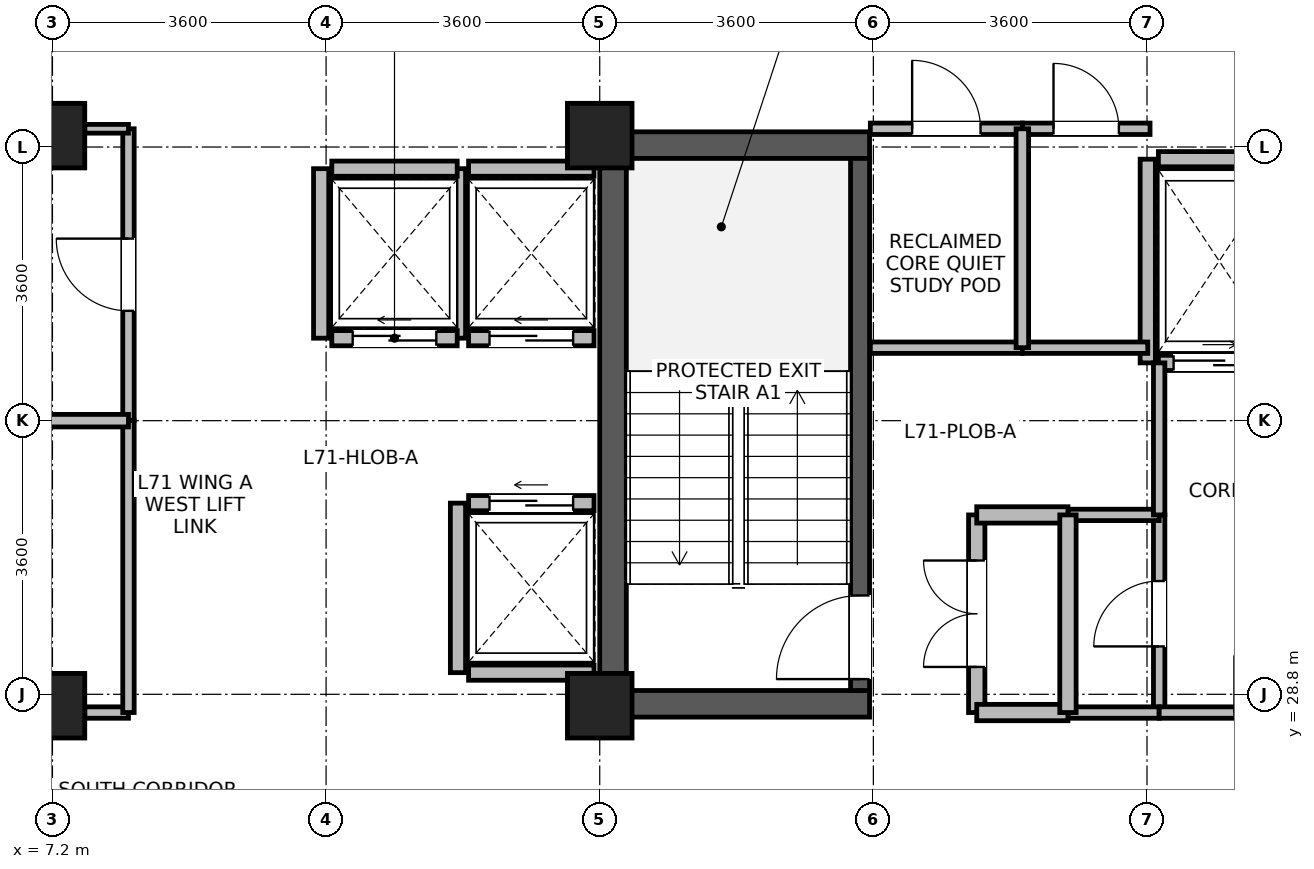
"""IFC4 building model, lengths in metres.
Left out: names, types, materials, properties, quantities, classifications, styles, units other than length and angle.
Written with IfcOpenShell. Run it as: python <this file> out.ifc"""

import sys

from ifc_helpers import new_model, si_unit, direction, frame, frame_2d, origin, origin_2d, place, context, subcontext, project, spatial, rectangle, extrude, source, transform, mapped, element, fill, save


model = new_model("IFC4")
c1 = context("Model", 3, precision=1e-05, world=origin(), true_north=direction((0.0, 1.0)))
c2 = subcontext(c1, "Body", "Model", "MODEL_VIEW")
j1 = project(units=[si_unit("LENGTHUNIT", "METRE"), si_unit("PLANEANGLEUNIT", "RADIAN")], contexts=[c1])
p1 = place(None, origin())
s1 = spatial("IfcSite", under=j1, at=p1, CompositionType="ELEMENT")
p2 = place(p1, origin())
s2 = spatial("IfcBuilding", under=s1, at=p2, CompositionType="ELEMENT")
p3 = place(p2, frame((0.0, 0.0, 275.8)))
s3 = spatial("IfcBuildingStorey", under=s2, at=p3, CompositionType="ELEMENT", Elevation=275.8)
p4 = place(p3, frame((14.575, 28.5, 0.0), z_axis=(0.0, 0.0, 1.0), x_axis=(0.0, 1.0, 0.0)))
e1 = element("IfcWall", 1, at=p4, inside=s3, PredefinedType="SHEAR", context=c2, shape_type="SweptSolid", body=[
    extrude(rectangle(XDim=7.7, YDim=0.35, at=frame_2d((3.85, 0.0))), origin(), (0.0, 0.0, 1.0), 3.475),
])
for number, where, z_axis, x_axis in (
    (2, (14.75, 28.675, 0.0), (0.0, 0.0, 1.0), (1.0, 0.0, 0.0)),
    (3, (14.75, 36.025, 0.0), (0.0, 0.0, 1.0), (1.0, 0.0, 0.0)),
):
    element("IfcWall", number, at=place(p3, frame(where, z_axis=z_axis, x_axis=x_axis)), inside=s3, PredefinedType="SHEAR", context=c2, shape_type="SweptSolid", body=[
        extrude(rectangle(XDim=3.2, YDim=0.35, at=frame_2d((1.6, 0.0))), origin(), (0.0, 0.0, 1.0), 3.475),
    ])
p5 = place(p3, frame((17.825, 28.85, 0.0), z_axis=(0.0, 0.0, 1.0), x_axis=(0.0, 1.0, 0.0)))
e4 = element("IfcWall", 4, at=p5, inside=s3, PredefinedType="SHEAR", context=c2, shape_type="SweptSolid", body=[
    extrude(rectangle(XDim=7.0, YDim=0.25, at=frame_2d((3.5, 0.0))), origin(), (0.0, 0.0, 1.0), 3.475),
])
p6 = place(p5, frame((0.15, 0.0, 0.0)))
e5 = element("IfcOpeningElement", 5, at=p6, cuts=e4, PredefinedType="OPENING", context=c2, shape_type="SweptSolid", body=[
    extrude(rectangle(XDim=1.1, YDim=2.08, at=frame_2d((0.55, 1.04))), frame((0.0, 0.135, 0.0), z_axis=(0.0, -1.0, 0.0), x_axis=(1.0, 0.0, 0.0)), (0.0, 0.0, 1.0), 0.27),
])
m1 = source(origin(), c2, "Body", "SweptSolid", [
    extrude(rectangle(XDim=0.85, YDim=0.85, at=origin_2d()), origin(), (0.0, 0.0, 1.0), 3.7),
])
for number, where, z_axis, x_axis in (
    (6, (7.2, 28.65, 0.0), (0.0, 0.0, 1.0), (1.0, 0.0, 0.0)),
    (7, (7.2, 36.15, 0.0), (0.0, 0.0, 1.0), (1.0, 0.0, 0.0)),
    (8, (14.4, 28.65, 0.0), (0.0, 0.0, 1.0), (1.0, 0.0, 0.0)),
    (9, (14.4, 36.15, 0.0), (0.0, 0.0, 1.0), (1.0, 0.0, 0.0)),
):
    element("IfcColumn", number, at=place(p3, frame(where, z_axis=z_axis, x_axis=x_axis)), inside=s3, PredefinedType="COLUMN", context=c2, shape_type="MappedRepresentation", body=[
        mapped(m1, transform((0.0, 0.0, 0.0), x_axis=(1.0, 0.0, 0.0), y_axis=(0.0, 1.0, 0.0), z_axis=(0.0, 0.0, 1.0), scale=1.0)),
    ])
p7 = place(p3, frame((12.675, 33.485, 0.0), z_axis=(0.0, 0.0, 1.0), x_axis=(1.0, 0.0, 0.0)))
e10 = element("IfcWall", 10, at=p7, inside=s3, PredefinedType="PARTITIONING", context=c2, shape_type="SweptSolid", body=[
    extrude(rectangle(XDim=1.65, YDim=0.2, at=frame_2d((0.825, 0.0))), origin(), (0.0, 0.0, 1.0), 3.455),
])
p8 = place(p7, frame((0.275, 0.0, 0.0)))
e11 = element("IfcOpeningElement", 11, at=p8, cuts=e10, PredefinedType="OPENING", context=c2, shape_type="SweptSolid", body=[
    extrude(rectangle(XDim=1.1, YDim=2.12, at=frame_2d((0.55, 1.06))), frame((0.0, 0.11, 0.0), z_axis=(0.0, -1.0, 0.0), x_axis=(1.0, 0.0, 0.0)), (0.0, 0.0, 1.0), 0.22),
])
p9 = place(p3, frame((12.675, 35.715, 0.0), z_axis=(0.0, 0.0, 1.0), x_axis=(1.0, 0.0, 0.0)))
e12 = element("IfcWall", 12, at=p9, inside=s3, PredefinedType="PARTITIONING", context=c2, shape_type="SweptSolid", body=[
    extrude(rectangle(XDim=1.65, YDim=0.2, at=frame_2d((0.825, 0.0))), origin(), (0.0, 0.0, 1.0), 3.455),
])
p10 = place(p3, frame((12.535, 33.485, 0.0), z_axis=(0.0, 0.0, 1.0), x_axis=(0.0, 1.0, 0.0)))
e13 = element("IfcWall", 13, at=p10, inside=s3, PredefinedType="PARTITIONING", context=c2, shape_type="SweptSolid", body=[
    extrude(rectangle(XDim=2.23, YDim=0.2, at=frame_2d((1.115, 0.0))), origin(), (0.0, 0.0, 1.0), 3.455),
])
p11 = place(p3, frame((12.675, 29.085, 0.0), z_axis=(0.0, 0.0, 1.0), x_axis=(1.0, 0.0, 0.0)))
e14 = element("IfcWall", 14, at=p11, inside=s3, PredefinedType="PARTITIONING", context=c2, shape_type="SweptSolid", body=[
    extrude(rectangle(XDim=1.65, YDim=0.2, at=frame_2d((0.825, 0.0))), origin(), (0.0, 0.0, 1.0), 3.455),
])
p12 = place(p3, frame((12.675, 31.315, 0.0), z_axis=(0.0, 0.0, 1.0), x_axis=(1.0, 0.0, 0.0)))
e15 = element("IfcWall", 15, at=p12, inside=s3, PredefinedType="PARTITIONING", context=c2, shape_type="SweptSolid", body=[
    extrude(rectangle(XDim=1.65, YDim=0.2, at=frame_2d((0.825, 0.0))), origin(), (0.0, 0.0, 1.0), 3.455),
])
p13 = place(p12, frame((0.275, 0.0, 0.0)))
e16 = element("IfcOpeningElement", 16, at=p13, cuts=e15, PredefinedType="OPENING", context=c2, shape_type="SweptSolid", body=[
    extrude(rectangle(XDim=1.1, YDim=2.12, at=frame_2d((0.55, 1.06))), frame((0.0, 0.11, 0.0), z_axis=(0.0, -1.0, 0.0), x_axis=(1.0, 0.0, 0.0)), (0.0, 0.0, 1.0), 0.22),
])
p14 = place(p3, frame((12.535, 29.085, 0.0), z_axis=(0.0, 0.0, 1.0), x_axis=(0.0, 1.0, 0.0)))
e17 = element("IfcWall", 17, at=p14, inside=s3, PredefinedType="PARTITIONING", context=c2, shape_type="SweptSolid", body=[
    extrude(rectangle(XDim=2.23, YDim=0.2, at=frame_2d((1.115, 0.0))), origin(), (0.0, 0.0, 1.0), 3.455),
])
p15 = place(p3, frame((10.875, 33.485, 0.0), z_axis=(0.0, 0.0, 1.0), x_axis=(1.0, 0.0, 0.0)))
e18 = element("IfcWall", 18, at=p15, inside=s3, PredefinedType="PARTITIONING", context=c2, shape_type="SweptSolid", body=[
    extrude(rectangle(XDim=1.65, YDim=0.2, at=frame_2d((0.825, 0.0))), origin(), (0.0, 0.0, 1.0), 3.455),
])
p16 = place(p15, frame((0.275, 0.0, 0.0)))
e19 = element("IfcOpeningElement", 19, at=p16, cuts=e18, PredefinedType="OPENING", context=c2, shape_type="SweptSolid", body=[
    extrude(rectangle(XDim=1.1, YDim=2.12, at=frame_2d((0.55, 1.06))), frame((0.0, 0.11, 0.0), z_axis=(0.0, -1.0, 0.0), x_axis=(1.0, 0.0, 0.0)), (0.0, 0.0, 1.0), 0.22),
])
p17 = place(p3, frame((10.875, 35.715, 0.0), z_axis=(0.0, 0.0, 1.0), x_axis=(1.0, 0.0, 0.0)))
e20 = element("IfcWall", 20, at=p17, inside=s3, PredefinedType="PARTITIONING", context=c2, shape_type="SweptSolid", body=[
    extrude(rectangle(XDim=1.65, YDim=0.2, at=frame_2d((0.825, 0.0))), origin(), (0.0, 0.0, 1.0), 3.455),
])
p18 = place(p3, frame((10.735, 33.485, 0.0), z_axis=(0.0, 0.0, 1.0), x_axis=(0.0, 1.0, 0.0)))
e21 = element("IfcWall", 21, at=p18, inside=s3, PredefinedType="PARTITIONING", context=c2, shape_type="SweptSolid", body=[
    extrude(rectangle(XDim=2.23, YDim=0.2, at=frame_2d((1.115, 0.0))), origin(), (0.0, 0.0, 1.0), 3.455),
])
p19 = place(p3, frame((21.75, 33.16, 0.0), z_axis=(0.0, 0.0, 1.0), x_axis=(1.0, 0.0, 0.0)))
e22 = element("IfcWall", 22, at=p19, inside=s3, PredefinedType="PARTITIONING", context=c2, shape_type="SweptSolid", body=[
    extrude(rectangle(XDim=1.6, YDim=0.2, at=frame_2d((0.8, 0.0))), origin(), (0.0, 0.0, 1.0), 3.455),
])
p20 = place(p19, frame((0.2, 0.0, 0.0)))
e23 = element("IfcOpeningElement", 23, at=p20, cuts=e22, PredefinedType="OPENING", context=c2, shape_type="SweptSolid", body=[
    extrude(rectangle(XDim=1.2, YDim=2.12, at=frame_2d((0.6, 1.06))), frame((0.0, 0.11, 0.0), z_axis=(0.0, -1.0, 0.0), x_axis=(1.0, 0.0, 0.0)), (0.0, 0.0, 1.0), 0.22),
])
p21 = place(p3, frame((21.75, 35.84, 0.0), z_axis=(0.0, 0.0, 1.0), x_axis=(1.0, 0.0, 0.0)))
e24 = element("IfcWall", 24, at=p21, inside=s3, PredefinedType="PARTITIONING", context=c2, shape_type="SweptSolid", body=[
    extrude(rectangle(XDim=1.6, YDim=0.2, at=frame_2d((0.8, 0.0))), origin(), (0.0, 0.0, 1.0), 2.555),
])
p22 = place(p3, frame((21.61, 33.16, 0.0), z_axis=(0.0, 0.0, 1.0), x_axis=(0.0, 1.0, 0.0)))
e25 = element("IfcWall", 25, at=p22, inside=s3, PredefinedType="PARTITIONING", context=c2, shape_type="SweptSolid", body=[
    extrude(rectangle(XDim=2.68, YDim=0.2, at=frame_2d((1.34, 0.0))), origin(), (0.0, 0.0, 1.0), 3.455),
])
p23 = place(p3, frame((7.625, 28.56, 0.0), z_axis=(0.0, 0.0, 1.0), x_axis=(1.0, 0.0, 0.0)))
e26 = element("IfcWall", 26, at=p23, inside=s3, PredefinedType="PARTITIONING", context=c2, shape_type="SweptSolid", body=[
    extrude(rectangle(XDim=0.575, YDim=0.15, at=frame_2d((0.288, 0.0))), origin(), (0.0, 0.0, 1.0), 2.905),
])
p24 = place(p3, frame((8.2, 32.4, 0.0), z_axis=(0.0, 0.0, 1.0), x_axis=(0.0, 1.0, 0.0)))
e27 = element("IfcWall", 27, at=p24, inside=s3, PredefinedType="PARTITIONING", context=c2, shape_type="SweptSolid", body=[
    extrude(rectangle(XDim=3.84, YDim=0.15, at=frame_2d((1.92, 0.0))), origin(), (0.0, 0.0, 1.0), 3.455),
])
p25 = place(p24, frame((1.445, 0.0, 0.0)))
e28 = element("IfcOpeningElement", 28, at=p25, cuts=e27, PredefinedType="OPENING", context=c2, shape_type="SweptSolid", body=[
    extrude(rectangle(XDim=0.95, YDim=2.1, at=frame_2d((0.475, 1.05))), frame((0.0, 0.085, 0.0), z_axis=(0.0, -1.0, 0.0), x_axis=(1.0, 0.0, 0.0)), (0.0, 0.0, 1.0), 0.17),
])
p26 = place(p3, frame((8.2, 28.56, 0.0), z_axis=(0.0, 0.0, 1.0), x_axis=(0.0, 1.0, 0.0)))
e29 = element("IfcWall", 29, at=p26, inside=s3, PredefinedType="PARTITIONING", context=c2, shape_type="SweptSolid", body=[
    extrude(rectangle(XDim=3.84, YDim=0.15, at=frame_2d((1.92, 0.0))), origin(), (0.0, 0.0, 1.0), 3.455),
])
p27 = place(p3, frame((19.36, 28.56, 0.0), z_axis=(0.0, 0.0, 1.0), x_axis=(0.0, 1.0, 0.0)))
e30 = element("IfcWall", 30, at=p27, inside=s3, PredefinedType="PARTITIONING", context=c2, shape_type="SweptSolid", body=[
    extrude(rectangle(XDim=2.6, YDim=0.215, at=frame_2d((1.3, 0.0))), origin(), (0.0, 0.0, 1.0), 3.455),
])
p28 = place(p27, frame((0.6, 0.0, 0.0)))
e31 = element("IfcOpeningElement", 31, at=p28, cuts=e30, PredefinedType="OPENING", context=c2, shape_type="SweptSolid", body=[
    extrude(rectangle(XDim=1.4, YDim=2.15, at=frame_2d((0.7, 1.075))), frame((0.0, 0.118, 0.0), z_axis=(0.0, -1.0, 0.0), x_axis=(1.0, 0.0, 0.0)), (0.0, 0.0, 1.0), 0.235),
])
p29 = place(p3, frame((21.76, 28.56, 0.0), z_axis=(0.0, 0.0, 1.0), x_axis=(0.0, 1.0, 0.0)))
e32 = element("IfcWall", 32, at=p29, inside=s3, PredefinedType="PARTITIONING", context=c2, shape_type="SweptSolid", body=[
    extrude(rectangle(XDim=2.6, YDim=0.15, at=frame_2d((1.3, 0.0))), origin(), (0.0, 0.0, 1.0), 3.455),
])
p30 = place(p29, frame((0.87, 0.0, 0.0)))
e33 = element("IfcOpeningElement", 33, at=p30, cuts=e32, PredefinedType="OPENING", context=c2, shape_type="SweptSolid", body=[
    extrude(rectangle(XDim=0.86, YDim=2.02, at=frame_2d((0.43, 1.01))), frame((0.0, 0.085, 0.0), z_axis=(0.0, -1.0, 0.0), x_axis=(1.0, 0.0, 0.0)), (0.0, 0.0, 1.0), 0.17),
])
p31 = place(p3, frame((17.96, 33.36, 0.0), z_axis=(0.0, 0.0, 1.0), x_axis=(1.0, 0.0, 0.0)))
e34 = element("IfcWall", 34, at=p31, inside=s3, PredefinedType="PARTITIONING", context=c2, shape_type="SweptSolid", body=[
    extrude(rectangle(XDim=2.0, YDim=0.15, at=frame_2d((1.0, 0.0))), origin(), (0.0, 0.0, 1.0), 3.455),
])
p32 = place(p3, frame((17.96, 36.24, 0.0), z_axis=(0.0, 0.0, 1.0), x_axis=(1.0, 0.0, 0.0)))
e35 = element("IfcWall", 35, at=p32, inside=s3, PredefinedType="PARTITIONING", context=c2, shape_type="SweptSolid", body=[
    extrude(rectangle(XDim=2.0, YDim=0.15, at=frame_2d((1.0, 0.0))), origin(), (0.0, 0.0, 1.0), 2.555),
])
p33 = place(p32, frame((0.55, 0.0, 0.0)))
e36 = element("IfcOpeningElement", 36, at=p33, cuts=e35, PredefinedType="OPENING", context=c2, shape_type="SweptSolid", body=[
    extrude(rectangle(XDim=0.9, YDim=2.08, at=frame_2d((0.45, 1.04))), frame((0.0, 0.085, 0.0), z_axis=(0.0, -1.0, 0.0), x_axis=(1.0, 0.0, 0.0)), (0.0, 0.0, 1.0), 0.17),
])
p34 = place(p3, frame((19.96, 33.36, 0.0), z_axis=(0.0, 0.0, 1.0), x_axis=(1.0, 0.0, 0.0)))
e37 = element("IfcWall", 37, at=p34, inside=s3, PredefinedType="PARTITIONING", context=c2, shape_type="SweptSolid", body=[
    extrude(rectangle(XDim=1.65, YDim=0.15, at=frame_2d((0.825, 0.0))), origin(), (0.0, 0.0, 1.0), 3.455),
])
p35 = place(p3, frame((19.96, 36.24, 0.0), z_axis=(0.0, 0.0, 1.0), x_axis=(1.0, 0.0, 0.0)))
e38 = element("IfcWall", 38, at=p35, inside=s3, PredefinedType="PARTITIONING", context=c2, shape_type="SweptSolid", body=[
    extrude(rectangle(XDim=1.68, YDim=0.15, at=frame_2d((0.84, 0.0))), origin(), (0.0, 0.0, 1.0), 2.555),
])
p36 = place(p35, frame((0.41, 0.0, 0.0)))
e39 = element("IfcOpeningElement", 39, at=p36, cuts=e38, PredefinedType="OPENING", context=c2, shape_type="SweptSolid", body=[
    extrude(rectangle(XDim=0.86, YDim=2.02, at=frame_2d((0.43, 1.01))), frame((0.0, 0.085, 0.0), z_axis=(0.0, -1.0, 0.0), x_axis=(1.0, 0.0, 0.0)), (0.0, 0.0, 1.0), 0.17),
])
p37 = place(p3, frame((20.56, 28.56, 0.0), z_axis=(0.0, 0.0, 1.0), x_axis=(1.0, 0.0, 0.0)))
e40 = element("IfcWall", 40, at=p37, inside=s3, PredefinedType="PARTITIONING", context=c2, shape_type="SweptSolid", body=[
    extrude(rectangle(XDim=1.2, YDim=0.15, at=frame_2d((0.6, 0.0))), origin(), (0.0, 0.0, 1.0), 2.555),
])
p38 = place(p3, frame((20.56, 31.16, 0.0), z_axis=(0.0, 0.0, 1.0), x_axis=(1.0, 0.0, 0.0)))
e41 = element("IfcWall", 41, at=p38, inside=s3, PredefinedType="PARTITIONING", context=c2, shape_type="SweptSolid", body=[
    extrude(rectangle(XDim=1.2, YDim=0.15, at=frame_2d((0.6, 0.0))), origin(), (0.0, 0.0, 1.0), 3.455),
])
p39 = place(p3, frame((19.36, 28.56, 0.0), z_axis=(0.0, 0.0, 1.0), x_axis=(1.0, 0.0, 0.0)))
e42 = element("IfcWall", 42, at=p39, inside=s3, PredefinedType="PARTITIONING", context=c2, shape_type="SweptSolid", body=[
    extrude(rectangle(XDim=1.2, YDim=0.215, at=frame_2d((0.6, 0.0))), origin(), (0.0, 0.0, 1.0), 2.555),
])
p40 = place(p3, frame((19.36, 31.16, 0.0), z_axis=(0.0, 0.0, 1.0), x_axis=(1.0, 0.0, 0.0)))
e43 = element("IfcWall", 43, at=p40, inside=s3, PredefinedType="PARTITIONING", context=c2, shape_type="SweptSolid", body=[
    extrude(rectangle(XDim=1.2, YDim=0.215, at=frame_2d((0.6, 0.0))), origin(), (0.0, 0.0, 1.0), 3.455),
])
p41 = place(p3, frame((3.732, 32.4, 0.0), z_axis=(0.0, 0.0, 1.0), x_axis=(1.0, 0.0, 0.0)))
e44 = element("IfcWall", 44, at=p41, inside=s3, PredefinedType="PARTITIONING", context=c2, shape_type="SweptSolid", body=[
    extrude(rectangle(XDim=4.468, YDim=0.165, at=frame_2d((2.234, 0.0))), origin(), (0.0, 0.0, 1.0), 3.455),
])
p42 = place(p3, frame((7.625, 36.24, 0.0), z_axis=(0.0, 0.0, 1.0), x_axis=(1.0, 0.0, 0.0)))
e45 = element("IfcWall", 45, at=p42, inside=s3, PredefinedType="PARTITIONING", context=c2, shape_type="SweptSolid", body=[
    extrude(rectangle(XDim=0.575, YDim=0.115, at=frame_2d((0.288, 0.0))), origin(), (0.0, 0.0, 1.0), 2.905),
])
p43 = place(p3, frame((21.76, 28.56, 0.0), z_axis=(0.0, 0.0, 1.0), x_axis=(1.0, 0.0, 0.0)))
e46 = element("IfcWall", 46, at=p43, inside=s3, PredefinedType="PARTITIONING", context=c2, shape_type="SweptSolid", body=[
    extrude(rectangle(XDim=3.48, YDim=0.15, at=frame_2d((1.74, 0.0))), origin(), (0.0, 0.0, 1.0), 2.555),
])
p44 = place(p43, frame((0.99, 0.0, 0.0)))
e47 = element("IfcOpeningElement", 47, at=p44, cuts=e46, PredefinedType="OPENING", context=c2, shape_type="SweptSolid", body=[
    extrude(rectangle(XDim=1.5, YDim=2.1, at=frame_2d((0.75, 1.05))), frame((0.0, 0.085, 0.0), z_axis=(0.0, -1.0, 0.0), x_axis=(1.0, 0.0, 0.0)), (0.0, 0.0, 1.0), 0.17),
])
p45 = place(p3, frame((19.96, 33.36, 0.0), z_axis=(0.0, 0.0, 1.0), x_axis=(0.0, 1.0, 0.0)))
e48 = element("IfcWall", 48, at=p45, inside=s3, PredefinedType="PARTITIONING", context=c2, shape_type="SweptSolid", body=[
    extrude(rectangle(XDim=2.88, YDim=0.165, at=frame_2d((1.44, 0.0))), origin(), (0.0, 0.0, 1.0), 3.455),
])
p46 = place(p3, frame((20.56, 28.56, 0.0), z_axis=(0.0, 0.0, 1.0), x_axis=(0.0, 1.0, 0.0)))
e49 = element("IfcWall", 49, at=p46, inside=s3, PredefinedType="PARTITIONING", context=c2, shape_type="SweptSolid", body=[
    extrude(rectangle(XDim=2.6, YDim=0.215, at=frame_2d((1.3, 0.0))), origin(), (0.0, 0.0, 1.0), 3.455),
])
p47 = place(p3, frame((21.76, 31.16, 0.0), z_axis=(0.0, 0.0, 1.0), x_axis=(0.0, 1.0, 0.0)))
e50 = element("IfcWall", 50, at=p47, inside=s3, PredefinedType="PARTITIONING", context=c2, shape_type="SweptSolid", body=[
    extrude(rectangle(XDim=2.0, YDim=0.15, at=frame_2d((1.0, 0.0))), origin(), (0.0, 0.0, 1.0), 3.455),
])
p48 = place(p6, origin())
e51 = element("IfcDoor", 51, at=p48, inside=s3, OperationType="SINGLE_SWING_LEFT", PredefinedType="DOOR", context=c2, shape_type="SweptSolid", body=[
    extrude(rectangle(XDim=1.1, YDim=2.08, at=frame_2d((0.55, 1.04))), frame((0.0, 0.025, 0.0), z_axis=(0.0, -1.0, 0.0), x_axis=(1.0, 0.0, 0.0)), (0.0, 0.0, 1.0), 0.05),
])
fill(e5, e51)
p49 = place(p8, origin())
e52 = element("IfcDoor", 52, at=p49, inside=s3, OperationType="SLIDING_TO_LEFT", PredefinedType="DOOR", context=c2, shape_type="SweptSolid", body=[
    extrude(rectangle(XDim=1.1, YDim=2.12, at=frame_2d((0.55, 1.06))), frame((0.0, 0.025, 0.0), z_axis=(0.0, -1.0, 0.0), x_axis=(1.0, 0.0, 0.0)), (0.0, 0.0, 1.0), 0.05),
])
fill(e11, e52)
p50 = place(p13, origin())
e53 = element("IfcDoor", 53, at=p50, inside=s3, OperationType="SLIDING_TO_LEFT", PredefinedType="DOOR", context=c2, shape_type="SweptSolid", body=[
    extrude(rectangle(XDim=1.1, YDim=2.12, at=frame_2d((0.55, 1.06))), frame((0.0, 0.025, 0.0), z_axis=(0.0, -1.0, 0.0), x_axis=(1.0, 0.0, 0.0)), (0.0, 0.0, 1.0), 0.05),
])
fill(e16, e53)
p51 = place(p16, origin())
e54 = element("IfcDoor", 54, at=p51, inside=s3, OperationType="SLIDING_TO_LEFT", PredefinedType="DOOR", context=c2, shape_type="SweptSolid", body=[
    extrude(rectangle(XDim=1.1, YDim=2.12, at=frame_2d((0.55, 1.06))), frame((0.0, 0.025, 0.0), z_axis=(0.0, -1.0, 0.0), x_axis=(1.0, 0.0, 0.0)), (0.0, 0.0, 1.0), 0.05),
])
fill(e19, e54)
p52 = place(p20, origin())
e55 = element("IfcDoor", 55, at=p52, inside=s3, OperationType="SLIDING_TO_RIGHT", PredefinedType="DOOR", context=c2, shape_type="SweptSolid", body=[
    extrude(rectangle(XDim=1.2, YDim=2.12, at=frame_2d((0.6, 1.06))), frame((0.0, 0.025, 0.0), z_axis=(0.0, -1.0, 0.0), x_axis=(1.0, 0.0, 0.0)), (0.0, 0.0, 1.0), 0.05),
])
fill(e23, e55)
p53 = place(p25, origin())
e56 = element("IfcDoor", 56, at=p53, inside=s3, OperationType="SINGLE_SWING_RIGHT", PredefinedType="DOOR", context=c2, shape_type="SweptSolid", body=[
    extrude(rectangle(XDim=0.95, YDim=2.1, at=frame_2d((0.475, 1.05))), frame((0.0, 0.025, 0.0), z_axis=(0.0, -1.0, 0.0), x_axis=(1.0, 0.0, 0.0)), (0.0, 0.0, 1.0), 0.05),
])
fill(e28, e56)
p54 = place(p28, origin())
e57 = element("IfcDoor", 57, at=p54, inside=s3, OperationType="DOUBLE_DOOR_SINGLE_SWING", PredefinedType="DOOR", context=c2, shape_type="SweptSolid", body=[
    extrude(rectangle(XDim=1.4, YDim=2.15, at=frame_2d((0.7, 1.075))), frame((0.0, 0.025, 0.0), z_axis=(0.0, -1.0, 0.0), x_axis=(1.0, 0.0, 0.0)), (0.0, 0.0, 1.0), 0.05),
])
fill(e31, e57)
p55 = place(p30, origin())
e58 = element("IfcDoor", 58, at=p55, inside=s3, OperationType="SINGLE_SWING_LEFT", PredefinedType="DOOR", context=c2, shape_type="SweptSolid", body=[
    extrude(rectangle(XDim=0.86, YDim=2.02, at=frame_2d((0.43, 1.01))), frame((0.0, 0.025, 0.0), z_axis=(0.0, -1.0, 0.0), x_axis=(1.0, 0.0, 0.0)), (0.0, 0.0, 1.0), 0.05),
])
fill(e33, e58)
p56 = place(p33, origin())
e59 = element("IfcDoor", 59, at=p56, inside=s3, OperationType="SINGLE_SWING_LEFT", PredefinedType="DOOR", context=c2, shape_type="SweptSolid", body=[
    extrude(rectangle(XDim=0.9, YDim=2.08, at=frame_2d((0.45, 1.04))), frame((0.0, 0.025, 0.0), z_axis=(0.0, -1.0, 0.0), x_axis=(1.0, 0.0, 0.0)), (0.0, 0.0, 1.0), 0.05),
])
fill(e36, e59)
p57 = place(p36, origin())
e60 = element("IfcDoor", 60, at=p57, inside=s3, OperationType="SINGLE_SWING_LEFT", PredefinedType="DOOR", context=c2, shape_type="SweptSolid", body=[
    extrude(rectangle(XDim=0.86, YDim=2.02, at=frame_2d((0.43, 1.01))), frame((0.0, 0.025, 0.0), z_axis=(0.0, -1.0, 0.0), x_axis=(1.0, 0.0, 0.0)), (0.0, 0.0, 1.0), 0.05),
])
fill(e39, e60)
save(model, sys.argv[1])
